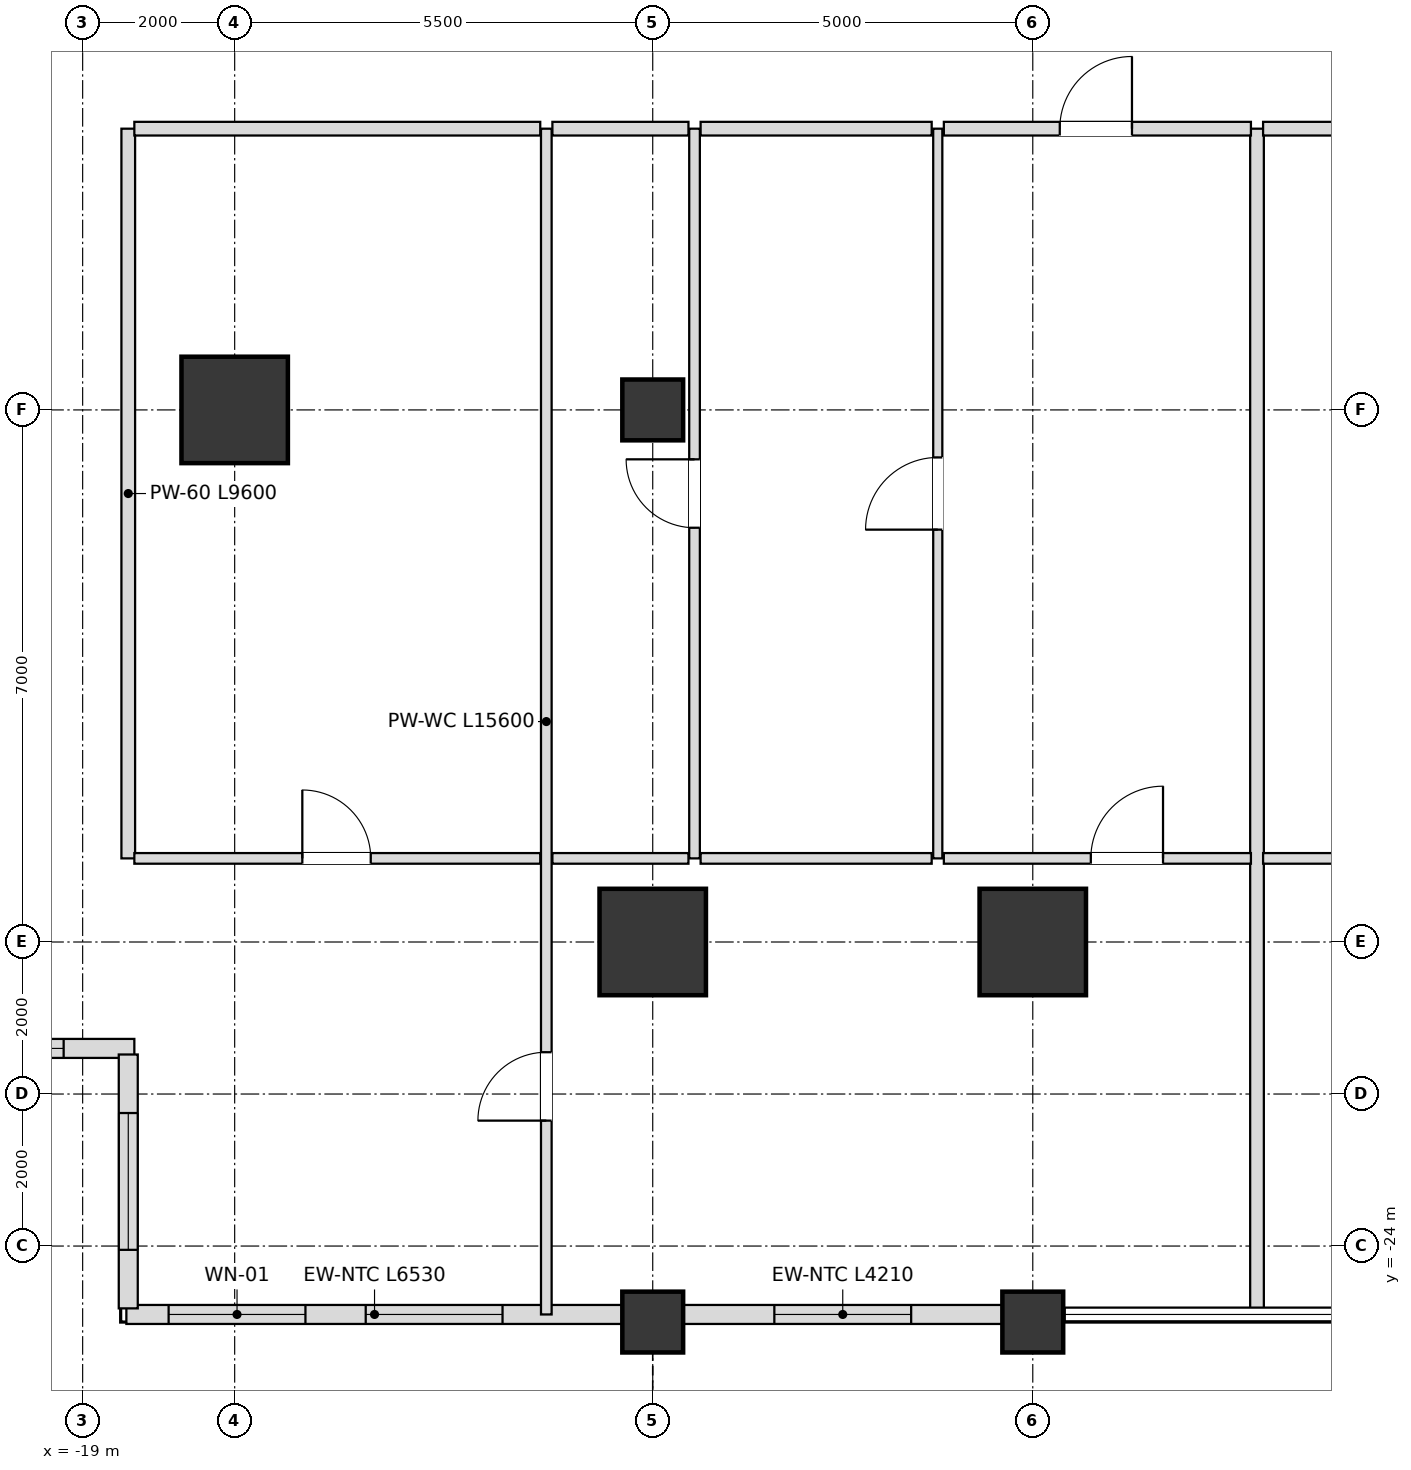
"""IFC4 building model, lengths in metres.
Left out: names, types, materials, properties, quantities, classifications, styles, units other than length and angle.
Written with IfcOpenShell. Run it as: python <this file> out.ifc"""

import sys

from ifc_helpers import new_model, si_unit, direction, frame, frame_2d, origin, origin_2d, place, context, subcontext, project, spatial, rectangle, extrude, element, fill, save


model = new_model("IFC4")
c1 = context("Model", 3, precision=1e-05, world=origin(), true_north=direction((0.0, 1.0)))
c2 = subcontext(c1, "Body", "Model", "MODEL_VIEW")
j1 = project(units=[si_unit("LENGTHUNIT", "METRE"), si_unit("PLANEANGLEUNIT", "RADIAN")], contexts=[c1])
p1 = place(None, origin())
s1 = spatial("IfcSite", under=j1, at=p1, CompositionType="ELEMENT")
p2 = place(p1, origin())
s2 = spatial("IfcBuilding", under=s1, at=p2, CompositionType="ELEMENT")
p3 = place(p2, frame((0.0, 0.0, 39.6)))
s3 = spatial("IfcBuildingStorey", under=s2, at=p3, CompositionType="ELEMENT", Elevation=39.6)
for number, where, z_axis, x_axis in (
    (1, (-11.5, -20.0, 0.0), (0.0, 0.0, 1.0), (1.0, 0.0, 0.0)),
    (2, (-6.5, -20.0, 0.0), (0.0, 0.0, 1.0), (1.0, 0.0, 0.0)),
    (3, (-17.0, -13.0, 0.0), (0.0, 0.0, 1.0), (1.0, 0.0, 0.0)),
):
    element("IfcColumn", number, at=place(p3, frame(where, z_axis=z_axis, x_axis=x_axis)), inside=s3, PredefinedType="USERDEFINED", context=c2, shape_type="SweptSolid", body=[
        extrude(rectangle(XDim=1.4, YDim=1.4, at=origin_2d()), origin(), (0.0, 0.0, 1.0), 3.6),
    ])
for number, where, z_axis, x_axis in (
    (4, (-11.5, -13.0, 0.0), (0.0, 0.0, 1.0), (1.0, 0.0, 0.0)),
    (5, (-11.5, -25.0, 0.0), (0.0, 0.0, 1.0), (1.0, 0.0, 0.0)),
    (6, (-6.5, -25.0, 0.0), (0.0, 0.0, 1.0), (1.0, 0.0, 0.0)),
):
    element("IfcColumn", number, at=place(p3, frame(where, z_axis=z_axis, x_axis=x_axis)), inside=s3, PredefinedType="COLUMN", context=c2, shape_type="SweptSolid", body=[
        extrude(rectangle(XDim=0.8, YDim=0.8, at=origin_2d()), origin(), (0.0, 0.0, 1.0), 3.6),
    ])
p4 = place(p3, frame((-18.425, -24.9, 0.0), z_axis=(0.0, 0.0, 1.0), x_axis=(1.0, 0.0, 0.0)))
e7 = element("IfcWall", 7, at=p4, inside=s3, PredefinedType="SOLIDWALL", context=c2, shape_type="SweptSolid", body=[
    extrude(rectangle(XDim=6.53, YDim=0.25, at=frame_2d((3.265, 0.0))), origin(), (0.0, 0.0, 1.0), 2.736),
])
p5 = place(p4, frame((0.556, 0.0, 0.72)))
e8 = element("IfcOpeningElement", 8, at=p5, cuts=e7, PredefinedType="OPENING", context=c2, shape_type="SweptSolid", body=[
    extrude(rectangle(XDim=1.8, YDim=1.68, at=frame_2d((0.9, 0.84))), frame((0.0, 0.135, 0.0), z_axis=(0.0, -1.0, 0.0), x_axis=(1.0, 0.0, 0.0)), (0.0, 0.0, 1.0), 0.27),
])
p6 = place(p4, frame((3.149, 0.0, 0.72)))
e9 = element("IfcOpeningElement", 9, at=p6, cuts=e7, PredefinedType="OPENING", context=c2, shape_type="SweptSolid", body=[
    extrude(rectangle(XDim=1.8, YDim=1.68, at=frame_2d((0.9, 0.84))), frame((0.0, 0.135, 0.0), z_axis=(0.0, -1.0, 0.0), x_axis=(1.0, 0.0, 0.0)), (0.0, 0.0, 1.0), 0.27),
])
p7 = place(p3, frame((-11.105, -24.9, 0.0), z_axis=(0.0, 0.0, 1.0), x_axis=(1.0, 0.0, 0.0)))
e10 = element("IfcWall", 10, at=p7, inside=s3, PredefinedType="SOLIDWALL", context=c2, shape_type="SweptSolid", body=[
    extrude(rectangle(XDim=4.21, YDim=0.25, at=frame_2d((2.105, 0.0))), origin(), (0.0, 0.0, 1.0), 2.736),
])
p8 = place(p7, frame((1.205, 0.0, 0.72)))
e11 = element("IfcOpeningElement", 11, at=p8, cuts=e10, PredefinedType="OPENING", context=c2, shape_type="SweptSolid", body=[
    extrude(rectangle(XDim=1.8, YDim=1.68, at=frame_2d((0.9, 0.84))), frame((0.0, 0.135, 0.0), z_axis=(0.0, -1.0, 0.0), x_axis=(1.0, 0.0, 0.0)), (0.0, 0.0, 1.0), 0.27),
])
p9 = place(p3, frame((-21.98, -21.4, 0.0), z_axis=(0.0, 0.0, 1.0), x_axis=(1.0, 0.0, 0.0)))
e12 = element("IfcWall", 12, at=p9, inside=s3, PredefinedType="SOLIDWALL", context=c2, shape_type="SweptSolid", body=[
    extrude(rectangle(XDim=3.66, YDim=0.25, at=frame_2d((1.83, 0.0))), origin(), (0.0, 0.0, 1.0), 2.736),
])
p10 = place(p9, frame((0.93, 0.0, 0.72)))
e13 = element("IfcOpeningElement", 13, at=p10, cuts=e12, PredefinedType="OPENING", context=c2, shape_type="SweptSolid", body=[
    extrude(rectangle(XDim=1.8, YDim=1.68, at=frame_2d((0.9, 0.84))), frame((0.0, 0.135, 0.0), z_axis=(0.0, -1.0, 0.0), x_axis=(1.0, 0.0, 0.0)), (0.0, 0.0, 1.0), 0.27),
])
p11 = place(p3, frame((-18.4, -21.48, 0.0), z_axis=(0.0, 0.0, 1.0), x_axis=(0.0, -1.0, 0.0)))
e14 = element("IfcWall", 14, at=p11, inside=s3, PredefinedType="SOLIDWALL", context=c2, shape_type="SweptSolid", body=[
    extrude(rectangle(XDim=3.34, YDim=0.25, at=frame_2d((1.67, 0.0))), origin(), (0.0, 0.0, 1.0), 2.736),
])
p12 = place(p11, frame((0.77, 0.0, 0.72)))
e15 = element("IfcOpeningElement", 15, at=p12, cuts=e14, PredefinedType="OPENING", context=c2, shape_type="SweptSolid", body=[
    extrude(rectangle(XDim=1.8, YDim=1.68, at=frame_2d((0.9, 0.84))), frame((0.0, 0.135, 0.0), z_axis=(0.0, -1.0, 0.0), x_axis=(1.0, 0.0, 0.0)), (0.0, 0.0, 1.0), 0.27),
])
p13 = place(p3, frame((-18.4, -18.9, 0.0), z_axis=(0.0, 0.0, 1.0), x_axis=(0.0, 1.0, 0.0)))
e16 = element("IfcWall", 16, at=p13, inside=s3, PredefinedType="PARTITIONING", context=c2, shape_type="SweptSolid", body=[
    extrude(rectangle(XDim=9.6, YDim=0.18, at=frame_2d((4.8, 0.0))), origin(), (0.0, 0.0, 1.0), 2.736),
])
p14 = place(p3, frame((-12.9, -24.9, 0.0), z_axis=(0.0, 0.0, 1.0), x_axis=(0.0, 1.0, 0.0)))
e17 = element("IfcWall", 17, at=p14, inside=s3, PredefinedType="PARTITIONING", context=c2, shape_type="SweptSolid", body=[
    extrude(rectangle(XDim=15.6, YDim=0.14, at=frame_2d((7.8, 0.0))), origin(), (0.0, 0.0, 1.0), 2.736),
])
p15 = place(p14, frame((2.55, 0.0, 0.0)))
e18 = element("IfcOpeningElement", 18, at=p15, cuts=e17, PredefinedType="OPENING", context=c2, shape_type="SweptSolid", body=[
    extrude(rectangle(XDim=0.9, YDim=2.1, at=frame_2d((0.45, 1.05))), frame((0.0, 0.08, 0.0), z_axis=(0.0, -1.0, 0.0), x_axis=(1.0, 0.0, 0.0)), (0.0, 0.0, 1.0), 0.16),
])
p16 = place(p3, frame((-10.95, -18.9, 0.0), z_axis=(0.0, 0.0, 1.0), x_axis=(0.0, 1.0, 0.0)))
e19 = element("IfcWall", 19, at=p16, inside=s3, PredefinedType="PARTITIONING", context=c2, shape_type="SweptSolid", body=[
    extrude(rectangle(XDim=9.6, YDim=0.14, at=frame_2d((4.8, 0.0))), origin(), (0.0, 0.0, 1.0), 2.816),
])
p17 = place(p16, frame((4.35, 0.0, 0.0)))
e20 = element("IfcOpeningElement", 20, at=p17, cuts=e19, PredefinedType="OPENING", context=c2, shape_type="SweptSolid", body=[
    extrude(rectangle(XDim=0.9, YDim=2.1, at=frame_2d((0.45, 1.05))), frame((0.0, 0.08, 0.0), z_axis=(0.0, -1.0, 0.0), x_axis=(1.0, 0.0, 0.0)), (0.0, 0.0, 1.0), 0.16),
])
p18 = place(p3, frame((-7.75, -18.9, 0.0), z_axis=(0.0, 0.0, 1.0), x_axis=(0.0, 1.0, 0.0)))
e21 = element("IfcWall", 21, at=p18, inside=s3, PredefinedType="PARTITIONING", context=c2, shape_type="SweptSolid", body=[
    extrude(rectangle(XDim=9.6, YDim=0.12, at=frame_2d((4.8, 0.0))), origin(), (0.0, 0.0, 1.0), 2.816),
])
p19 = place(p18, frame((4.325, 0.0, 0.0)))
e22 = element("IfcOpeningElement", 22, at=p19, cuts=e21, PredefinedType="OPENING", context=c2, shape_type="SweptSolid", body=[
    extrude(rectangle(XDim=0.95, YDim=2.1, at=frame_2d((0.475, 1.05))), frame((0.0, 0.07, 0.0), z_axis=(0.0, -1.0, 0.0), x_axis=(1.0, 0.0, 0.0)), (0.0, 0.0, 1.0), 0.14),
])
p20 = place(p3, frame((-3.55, -24.9, 0.0), z_axis=(0.0, 0.0, 1.0), x_axis=(0.0, 1.0, 0.0)))
e23 = element("IfcWall", 23, at=p20, inside=s3, PredefinedType="PARTITIONING", context=c2, shape_type="SweptSolid", body=[
    extrude(rectangle(XDim=15.6, YDim=0.18, at=frame_2d((7.8, 0.0))), origin(), (0.0, 0.0, 1.0), 2.816),
])
p21 = place(p3, frame((-18.32, -18.9, 0.0), z_axis=(0.0, 0.0, 1.0), x_axis=(1.0, 0.0, 0.0)))
e24 = element("IfcWall", 24, at=p21, inside=s3, PredefinedType="PARTITIONING", context=c2, shape_type="SweptSolid", body=[
    extrude(rectangle(XDim=5.34, YDim=0.14, at=frame_2d((2.67, 0.0))), origin(), (0.0, 0.0, 1.0), 2.736),
])
p22 = place(p21, frame((2.21, 0.0, 0.0)))
e25 = element("IfcOpeningElement", 25, at=p22, cuts=e24, PredefinedType="OPENING", context=c2, shape_type="SweptSolid", body=[
    extrude(rectangle(XDim=0.9, YDim=2.1, at=frame_2d((0.45, 1.05))), frame((0.0, 0.08, 0.0), z_axis=(0.0, -1.0, 0.0), x_axis=(1.0, 0.0, 0.0)), (0.0, 0.0, 1.0), 0.16),
])
p23 = place(p3, frame((-12.82, -18.9, 0.0), z_axis=(0.0, 0.0, 1.0), x_axis=(1.0, 0.0, 0.0)))
e26 = element("IfcWall", 26, at=p23, inside=s3, PredefinedType="PARTITIONING", context=c2, shape_type="SweptSolid", body=[
    extrude(rectangle(XDim=1.79, YDim=0.14, at=frame_2d((0.895, 0.0))), origin(), (0.0, 0.0, 1.0), 2.736),
])
p24 = place(p3, frame((-10.87, -18.9, 0.0), z_axis=(0.0, 0.0, 1.0), x_axis=(1.0, 0.0, 0.0)))
e27 = element("IfcWall", 27, at=p24, inside=s3, PredefinedType="PARTITIONING", context=c2, shape_type="SweptSolid", body=[
    extrude(rectangle(XDim=3.04, YDim=0.14, at=frame_2d((1.52, 0.0))), origin(), (0.0, 0.0, 1.0), 3.38),
])
p25 = place(p3, frame((-7.67, -18.9, 0.0), z_axis=(0.0, 0.0, 1.0), x_axis=(1.0, 0.0, 0.0)))
e28 = element("IfcWall", 28, at=p25, inside=s3, PredefinedType="PARTITIONING", context=c2, shape_type="SweptSolid", body=[
    extrude(rectangle(XDim=4.04, YDim=0.14, at=frame_2d((2.02, 0.0))), origin(), (0.0, 0.0, 1.0), 2.816),
])
p26 = place(p25, frame((1.934, 0.0, 0.0)))
e29 = element("IfcOpeningElement", 29, at=p26, cuts=e28, PredefinedType="OPENING", context=c2, shape_type="SweptSolid", body=[
    extrude(rectangle(XDim=0.95, YDim=2.1, at=frame_2d((0.475, 1.05))), frame((0.0, 0.08, 0.0), z_axis=(0.0, -1.0, 0.0), x_axis=(1.0, 0.0, 0.0)), (0.0, 0.0, 1.0), 0.16),
])
p27 = place(p3, frame((-3.47, -18.9, 0.0), z_axis=(0.0, 0.0, 1.0), x_axis=(1.0, 0.0, 0.0)))
e30 = element("IfcWall", 30, at=p27, inside=s3, PredefinedType="PARTITIONING", context=c2, shape_type="SweptSolid", body=[
    extrude(rectangle(XDim=1.79, YDim=0.14, at=frame_2d((0.895, 0.0))), origin(), (0.0, 0.0, 1.0), 3.38),
])
p28 = place(p3, frame((-18.32, -9.3, 0.0), z_axis=(0.0, 0.0, 1.0), x_axis=(1.0, 0.0, 0.0)))
e31 = element("IfcWall", 31, at=p28, inside=s3, PredefinedType="PARTITIONING", context=c2, shape_type="SweptSolid", body=[
    extrude(rectangle(XDim=5.34, YDim=0.18, at=frame_2d((2.67, 0.0))), origin(), (0.0, 0.0, 1.0), 2.816),
])
p29 = place(p3, frame((-12.82, -9.3, 0.0), z_axis=(0.0, 0.0, 1.0), x_axis=(1.0, 0.0, 0.0)))
e32 = element("IfcWall", 32, at=p29, inside=s3, PredefinedType="PARTITIONING", context=c2, shape_type="SweptSolid", body=[
    extrude(rectangle(XDim=1.79, YDim=0.18, at=frame_2d((0.895, 0.0))), origin(), (0.0, 0.0, 1.0), 3.38),
])
p30 = place(p3, frame((-10.87, -9.3, 0.0), z_axis=(0.0, 0.0, 1.0), x_axis=(1.0, 0.0, 0.0)))
e33 = element("IfcWall", 33, at=p30, inside=s3, PredefinedType="PARTITIONING", context=c2, shape_type="SweptSolid", body=[
    extrude(rectangle(XDim=3.04, YDim=0.18, at=frame_2d((1.52, 0.0))), origin(), (0.0, 0.0, 1.0), 3.38),
])
p31 = place(p3, frame((-7.67, -9.3, 0.0), z_axis=(0.0, 0.0, 1.0), x_axis=(1.0, 0.0, 0.0)))
e34 = element("IfcWall", 34, at=p31, inside=s3, PredefinedType="PARTITIONING", context=c2, shape_type="SweptSolid", body=[
    extrude(rectangle(XDim=4.04, YDim=0.18, at=frame_2d((2.02, 0.0))), origin(), (0.0, 0.0, 1.0), 2.816),
])
p32 = place(p31, frame((1.525, 0.0, 0.0)))
e35 = element("IfcOpeningElement", 35, at=p32, cuts=e34, PredefinedType="OPENING", context=c2, shape_type="SweptSolid", body=[
    extrude(rectangle(XDim=0.95, YDim=2.15, at=frame_2d((0.475, 1.075))), frame((0.0, 0.1, 0.0), z_axis=(0.0, -1.0, 0.0), x_axis=(1.0, 0.0, 0.0)), (0.0, 0.0, 1.0), 0.2),
])
p33 = place(p3, frame((-3.47, -9.3, 0.0), z_axis=(0.0, 0.0, 1.0), x_axis=(1.0, 0.0, 0.0)))
e36 = element("IfcWall", 36, at=p33, inside=s3, PredefinedType="PARTITIONING", context=c2, shape_type="SweptSolid", body=[
    extrude(rectangle(XDim=1.79, YDim=0.18, at=frame_2d((0.895, 0.0))), origin(), (0.0, 0.0, 1.0), 3.38),
])
p34 = place(p5, origin())
e37 = element("IfcWindow", 37, at=p34, inside=s3, PartitioningType="SINGLE_PANEL", PredefinedType="WINDOW", context=c2, shape_type="SweptSolid", body=[
    extrude(rectangle(XDim=1.8, YDim=1.68, at=frame_2d((0.9, 0.84))), frame((0.0, 0.03, 0.0), z_axis=(0.0, -1.0, 0.0), x_axis=(1.0, 0.0, 0.0)), (0.0, 0.0, 1.0), 0.06),
])
fill(e8, e37)
p35 = place(p6, origin())
e38 = element("IfcWindow", 38, at=p35, inside=s3, PartitioningType="SINGLE_PANEL", PredefinedType="WINDOW", context=c2, shape_type="SweptSolid", body=[
    extrude(rectangle(XDim=1.8, YDim=1.68, at=frame_2d((0.9, 0.84))), frame((0.0, 0.03, 0.0), z_axis=(0.0, -1.0, 0.0), x_axis=(1.0, 0.0, 0.0)), (0.0, 0.0, 1.0), 0.06),
])
fill(e9, e38)
p36 = place(p8, origin())
e39 = element("IfcWindow", 39, at=p36, inside=s3, PartitioningType="SINGLE_PANEL", PredefinedType="WINDOW", context=c2, shape_type="SweptSolid", body=[
    extrude(rectangle(XDim=1.8, YDim=1.68, at=frame_2d((0.9, 0.84))), frame((0.0, 0.03, 0.0), z_axis=(0.0, -1.0, 0.0), x_axis=(1.0, 0.0, 0.0)), (0.0, 0.0, 1.0), 0.06),
])
fill(e11, e39)
p37 = place(p10, origin())
e40 = element("IfcWindow", 40, at=p37, inside=s3, PartitioningType="SINGLE_PANEL", PredefinedType="WINDOW", context=c2, shape_type="SweptSolid", body=[
    extrude(rectangle(XDim=1.8, YDim=1.68, at=frame_2d((0.9, 0.84))), frame((0.0, 0.03, 0.0), z_axis=(0.0, -1.0, 0.0), x_axis=(1.0, 0.0, 0.0)), (0.0, 0.0, 1.0), 0.06),
])
fill(e13, e40)
p38 = place(p12, origin())
e41 = element("IfcWindow", 41, at=p38, inside=s3, PartitioningType="SINGLE_PANEL", PredefinedType="WINDOW", context=c2, shape_type="SweptSolid", body=[
    extrude(rectangle(XDim=1.8, YDim=1.68, at=frame_2d((0.9, 0.84))), frame((0.0, 0.03, 0.0), z_axis=(0.0, -1.0, 0.0), x_axis=(1.0, 0.0, 0.0)), (0.0, 0.0, 1.0), 0.06),
])
fill(e15, e41)
p39 = place(p32, origin())
e42 = element("IfcDoor", 42, at=p39, inside=s3, OperationType="SINGLE_SWING_RIGHT", PredefinedType="DOOR", context=c2, shape_type="SweptSolid", body=[
    extrude(rectangle(XDim=0.95, YDim=2.15, at=frame_2d((0.475, 1.075))), frame((0.0, 0.025, 0.0), z_axis=(0.0, -1.0, 0.0), x_axis=(1.0, 0.0, 0.0)), (0.0, 0.0, 1.0), 0.05),
])
fill(e35, e42)
p40 = place(p19, origin())
e43 = element("IfcDoor", 43, at=p40, inside=s3, OperationType="SINGLE_SWING_LEFT", PredefinedType="DOOR", context=c2, shape_type="SweptSolid", body=[
    extrude(rectangle(XDim=0.95, YDim=2.1, at=frame_2d((0.475, 1.05))), frame((0.0, 0.025, 0.0), z_axis=(0.0, -1.0, 0.0), x_axis=(1.0, 0.0, 0.0)), (0.0, 0.0, 1.0), 0.05),
])
fill(e22, e43)
p41 = place(p17, origin())
e44 = element("IfcDoor", 44, at=p41, inside=s3, OperationType="SINGLE_SWING_RIGHT", PredefinedType="DOOR", context=c2, shape_type="SweptSolid", body=[
    extrude(rectangle(XDim=0.9, YDim=2.1, at=frame_2d((0.45, 1.05))), frame((0.0, 0.025, 0.0), z_axis=(0.0, -1.0, 0.0), x_axis=(1.0, 0.0, 0.0)), (0.0, 0.0, 1.0), 0.05),
])
fill(e20, e44)
p42 = place(p22, origin())
e45 = element("IfcDoor", 45, at=p42, inside=s3, OperationType="SINGLE_SWING_LEFT", PredefinedType="DOOR", context=c2, shape_type="SweptSolid", body=[
    extrude(rectangle(XDim=0.9, YDim=2.1, at=frame_2d((0.45, 1.05))), frame((0.0, 0.025, 0.0), z_axis=(0.0, -1.0, 0.0), x_axis=(1.0, 0.0, 0.0)), (0.0, 0.0, 1.0), 0.05),
])
fill(e25, e45)
p43 = place(p26, origin())
e46 = element("IfcDoor", 46, at=p43, inside=s3, OperationType="SINGLE_SWING_RIGHT", PredefinedType="DOOR", context=c2, shape_type="SweptSolid", body=[
    extrude(rectangle(XDim=0.95, YDim=2.1, at=frame_2d((0.475, 1.05))), frame((0.0, 0.025, 0.0), z_axis=(0.0, -1.0, 0.0), x_axis=(1.0, 0.0, 0.0)), (0.0, 0.0, 1.0), 0.05),
])
fill(e29, e46)
p44 = place(p15, origin())
e47 = element("IfcDoor", 47, at=p44, inside=s3, OperationType="SINGLE_SWING_LEFT", PredefinedType="DOOR", context=c2, shape_type="SweptSolid", body=[
    extrude(rectangle(XDim=0.9, YDim=2.1, at=frame_2d((0.45, 1.05))), frame((0.0, 0.025, 0.0), z_axis=(0.0, -1.0, 0.0), x_axis=(1.0, 0.0, 0.0)), (0.0, 0.0, 1.0), 0.05),
])
fill(e18, e47)
save(model, sys.argv[1])
